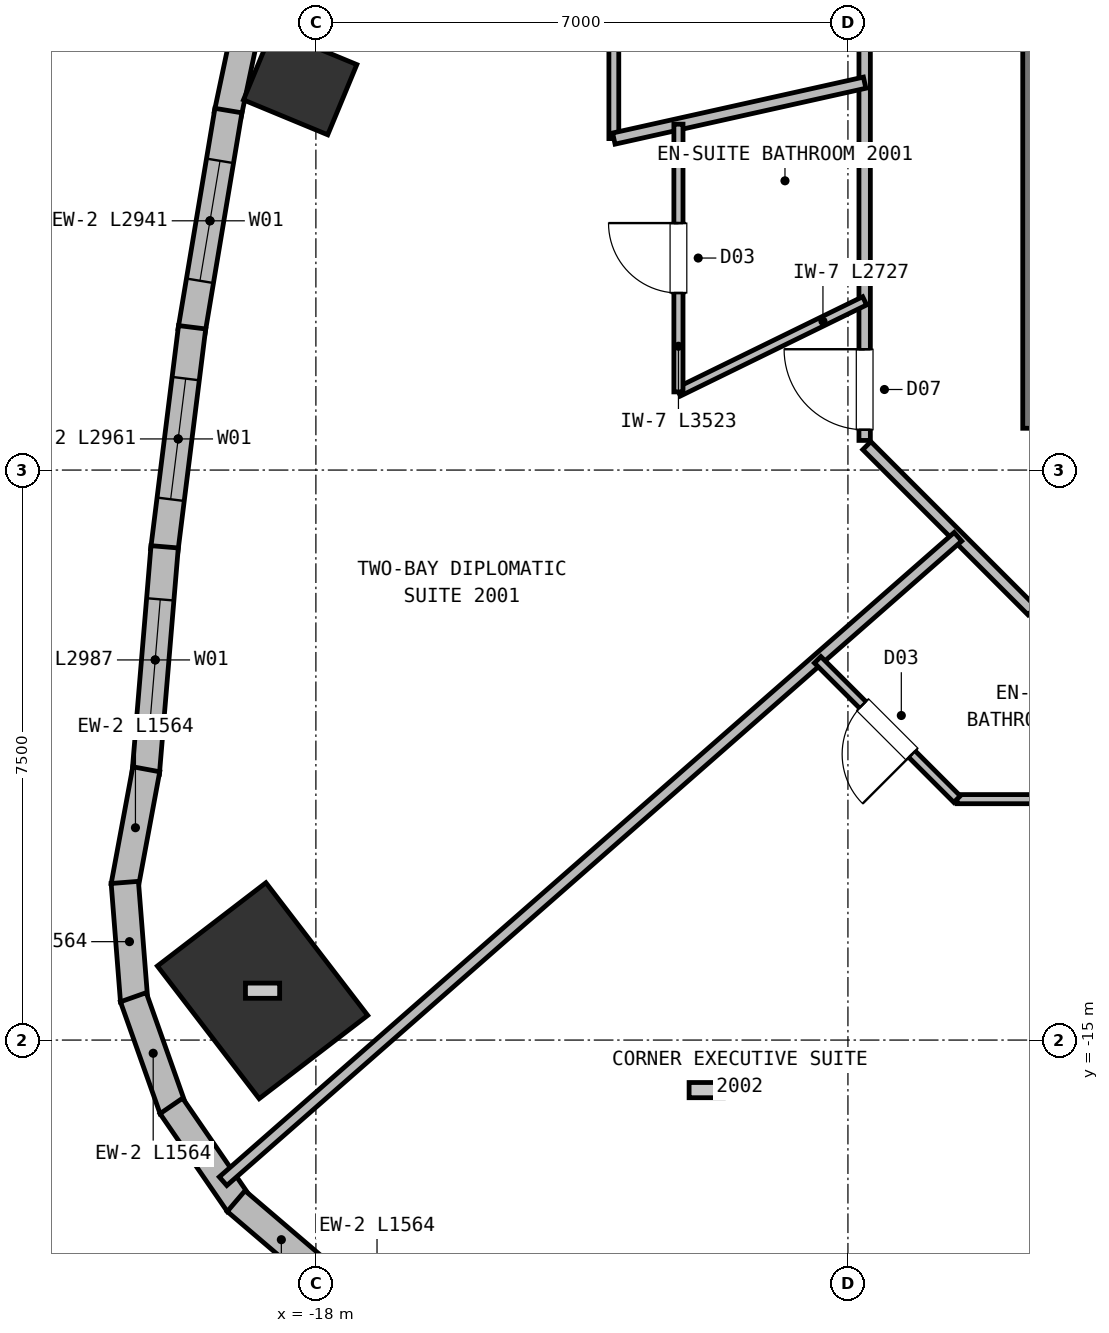
"""IFC4 building model, lengths in metres.
Left out: names, types, materials, properties, quantities, classifications, styles, units other than length and angle.
Written with IfcOpenShell. Run it as: python <this file> out.ifc"""

import sys

from ifc_helpers import new_model, si_unit, direction, frame, frame_2d, origin, origin_2d, place, context, subcontext, project, spatial, rectangle, extrude, element, fill, save


model = new_model("IFC4")
c1 = context("Model", 3, precision=1e-05, world=origin(), true_north=direction((0.0, 1.0)))
c2 = subcontext(c1, "Body", "Model", "MODEL_VIEW")
j1 = project(units=[si_unit("LENGTHUNIT", "METRE"), si_unit("PLANEANGLEUNIT", "RADIAN")], contexts=[c1])
p1 = place(None, origin())
s1 = spatial("IfcSite", under=j1, at=p1, CompositionType="ELEMENT")
p2 = place(p1, origin())
s2 = spatial("IfcBuilding", under=s1, at=p2, CompositionType="ELEMENT")
p3 = place(p2, frame((0.0, 0.0, 71.75)))
s3 = spatial("IfcBuildingStorey", under=s2, at=p3, CompositionType="ELEMENT", Elevation=71.75)
p4 = place(p3, frame((-8.35, -6.95, 0.0), z_axis=(0.0, 0.0, 1.0), x_axis=(0.0, 1.0, 0.0)))
e1 = element("IfcWall", 1, at=p4, inside=s3, PredefinedType="SHEAR", context=c2, shape_type="SweptSolid", body=[
    extrude(rectangle(XDim=8.1, YDim=0.7, at=frame_2d((4.05, 0.0))), origin(), (0.0, 0.0, 1.0), 3.5),
])
p5 = place(p3, frame((-18.207, -2.397, 0.0), z_axis=(0.0, 0.0, 1.0), x_axis=(0.382683432365, 0.923879532511, 0.0)))
e2 = element("IfcColumn", 2, at=p5, inside=s3, PredefinedType="COLUMN", context=c2, shape_type="SweptSolid", body=[
    extrude(rectangle(XDim=1.0, YDim=1.2, at=origin_2d()), origin(), (0.0, 0.0, 1.0), 3.75),
])
p6 = place(p3, frame((-18.702, -14.351, 0.0), z_axis=(0.0, 0.0, 1.0), x_axis=(0.793353340291, 0.608761429009, 0.0)))
e3 = element("IfcColumn", 3, at=p6, inside=s3, PredefinedType="COLUMN", context=c2, shape_type="SweptSolid", body=[
    extrude(rectangle(XDim=1.8, YDim=2.2, at=origin_2d()), origin(), (0.0, 0.0, 1.0), 3.75),
])
p7 = place(p3, frame((-19.16, -2.819, 0.0), z_axis=(0.0, 0.0, 1.0), x_axis=(0.206216567534, 0.978506375694, 0.0)))
e4 = element("IfcWall", 4, at=p7, inside=s3, PredefinedType="SOLIDWALL", context=c2, shape_type="SweptSolid", body=[
    extrude(rectangle(XDim=2.926, YDim=0.36, at=frame_2d((1.463, 0.0))), origin(), (0.0, 0.0, 1.0), 3.5),
])
p8 = place(p3, frame((-19.636, -5.671, 0.0), z_axis=(0.0, 0.0, 1.0), x_axis=(0.164870141486, 0.986315282476, 0.0)))
e5 = element("IfcWall", 5, at=p8, inside=s3, PredefinedType="SOLIDWALL", context=c2, shape_type="SweptSolid", body=[
    extrude(rectangle(XDim=2.941, YDim=0.36, at=frame_2d((1.47, 0.0))), origin(), (0.0, 0.0, 1.0), 3.5),
])
p9 = place(p8, frame((0.67, 0.0, 0.72)))
e6 = element("IfcOpeningElement", 6, at=p9, cuts=e5, PredefinedType="OPENING", context=c2, shape_type="SweptSolid", body=[
    extrude(rectangle(XDim=1.6, YDim=1.88, at=frame_2d((0.8, 0.94))), frame((0.0, 0.19, 0.0), z_axis=(0.0, -1.0, 0.0), x_axis=(1.0, 0.0, 0.0)), (0.0, 0.0, 1.0), 0.38),
])
p10 = place(p3, frame((-19.995, -8.56, 0.0), z_axis=(0.0, 0.0, 1.0), x_axis=(0.123740486397, 0.99231461343, 0.0)))
e7 = element("IfcWall", 7, at=p10, inside=s3, PredefinedType="SOLIDWALL", context=c2, shape_type="SweptSolid", body=[
    extrude(rectangle(XDim=2.961, YDim=0.36, at=frame_2d((1.481, 0.0))), origin(), (0.0, 0.0, 1.0), 3.5),
])
p11 = place(p10, frame((0.681, 0.0, 0.72)))
e8 = element("IfcOpeningElement", 8, at=p11, cuts=e7, PredefinedType="OPENING", context=c2, shape_type="SweptSolid", body=[
    extrude(rectangle(XDim=1.6, YDim=1.88, at=frame_2d((0.8, 0.94))), frame((0.0, 0.19, 0.0), z_axis=(0.0, -1.0, 0.0), x_axis=(1.0, 0.0, 0.0)), (0.0, 0.0, 1.0), 0.38),
])
p12 = place(p3, frame((-20.238, -11.487, 0.0), z_axis=(0.0, 0.0, 1.0), x_axis=(0.083126652996, 0.996538990487, 0.0)))
e9 = element("IfcWall", 9, at=p12, inside=s3, PredefinedType="SOLIDWALL", context=c2, shape_type="SweptSolid", body=[
    extrude(rectangle(XDim=2.987, YDim=0.36, at=frame_2d((1.493, 0.0))), origin(), (0.0, 0.0, 1.0), 3.5),
])
p13 = place(p12, frame((0.694, 0.0, 0.72)))
e10 = element("IfcOpeningElement", 10, at=p13, cuts=e9, PredefinedType="OPENING", context=c2, shape_type="SweptSolid", body=[
    extrude(rectangle(XDim=1.6, YDim=1.88, at=frame_2d((0.8, 0.94))), frame((0.0, 0.19, 0.0), z_axis=(0.0, -1.0, 0.0), x_axis=(1.0, 0.0, 0.0)), (0.0, 0.0, 1.0), 0.38),
])
for number, where, z_axis, x_axis in (
    (11, (-20.517, -12.975, 0.0), (0.0, 0.0, 1.0), (0.182, 0.983, 0.0)),
    (12, (-20.391, -14.485, 0.0), (0.0, 0.0, 1.0), (-0.079, 0.997, 0.0)),
    (13, (-19.88, -15.911, 0.0), (0.0, 0.0, 1.0), (-0.334, 0.943, 0.0)),
):
    element("IfcWall", number, at=place(p3, frame(where, z_axis=z_axis, x_axis=x_axis)), inside=s3, PredefinedType="SOLIDWALL", context=c2, shape_type="SweptSolid", body=[
        extrude(rectangle(XDim=1.564, YDim=0.36, at=frame_2d((0.782, 0.0))), origin(), (0.0, 0.0, 1.0), 3.5),
    ])
for number, where, z_axis, x_axis in (
    (14, (-19.016, -17.156, 0.0), (0.0, 0.0, 1.0), (-0.566, 0.824, 0.0)),
    (15, (-17.86, -18.135, 0.0), (0.0, 0.0, 1.0), (-0.76, 0.649, 0.0)),
):
    element("IfcWall", number, at=place(p3, frame(where, z_axis=z_axis, x_axis=x_axis)), inside=s3, PredefinedType="SOLIDWALL", context=c2, shape_type="SweptSolid", body=[
        extrude(rectangle(XDim=1.564, YDim=0.36, at=frame_2d((0.782, 0.0))), origin(), (0.0, 0.0, 1.0), 3.5),
    ])
p14 = place(p3, frame((-10.78, -7.11, 0.0), z_axis=(0.0, 0.0, 1.0), x_axis=(0.0, 1.0, 0.0)))
e16 = element("IfcWall", 16, at=p14, inside=s3, PredefinedType="PARTITIONING", context=c2, shape_type="SweptSolid", body=[
    extrude(rectangle(XDim=14.22, YDim=0.15, at=frame_2d((7.11, 0.0))), origin(), (0.0, 0.0, 1.0), 3.12),
])
p15 = place(p14, frame((5.471, 0.0, 0.0)))
e17 = element("IfcOpeningElement", 17, at=p15, cuts=e16, PredefinedType="OPENING", context=c2, shape_type="SweptSolid", body=[
    extrude(rectangle(XDim=0.95, YDim=2.1, at=frame_2d((0.475, 1.05))), frame((0.0, 0.085, 0.0), z_axis=(0.0, -1.0, 0.0), x_axis=(1.0, 0.0, 0.0)), (0.0, 0.0, 1.0), 0.17),
])
p16 = place(p14, frame((7.83, 0.0, 0.0)))
e18 = element("IfcOpeningElement", 18, at=p16, cuts=e16, PredefinedType="OPENING", context=c2, shape_type="SweptSolid", body=[
    extrude(rectangle(XDim=1.0, YDim=2.15, at=frame_2d((0.5, 1.075))), frame((0.0, 0.085, 0.0), z_axis=(0.0, -1.0, 0.0), x_axis=(1.0, 0.0, 0.0)), (0.0, 0.0, 1.0), 0.17),
])
p17 = place(p14, frame((11.294, 0.0, 0.0)))
e19 = element("IfcOpeningElement", 19, at=p17, cuts=e16, PredefinedType="OPENING", context=c2, shape_type="SweptSolid", body=[
    extrude(rectangle(XDim=1.0, YDim=2.15, at=frame_2d((0.5, 1.075))), frame((0.0, 0.085, 0.0), z_axis=(0.0, -1.0, 0.0), x_axis=(1.0, 0.0, 0.0)), (0.0, 0.0, 1.0), 0.17),
])
p18 = place(p14, frame((0.14, 0.0, 0.0)))
e20 = element("IfcOpeningElement", 20, at=p18, cuts=e16, PredefinedType="OPENING", context=c2, shape_type="SweptSolid", body=[
    extrude(rectangle(XDim=1.06, YDim=2.15, at=frame_2d((0.53, 1.075))), frame((0.0, 0.085, 0.0), z_axis=(0.0, -1.0, 0.0), x_axis=(1.0, 0.0, 0.0)), (0.0, 0.0, 1.0), 0.17),
])
p19 = place(p3, frame((-8.578, -9.352, 0.0), z_axis=(0.0, 0.0, 1.0), x_axis=(-0.707067066127, 0.707146494016, 0.0)))
e21 = element("IfcWall", 21, at=p19, inside=s3, PredefinedType="PARTITIONING", context=c2, shape_type="SweptSolid", body=[
    extrude(rectangle(XDim=3.074, YDim=0.15, at=frame_2d((1.537, 0.0))), origin(), (0.0, 0.0, 1.0), 3.5),
])
p20 = place(p3, frame((-14.08, -3.138, 0.0), z_axis=(0.0, 0.0, 1.0), x_axis=(0.0, 1.0, 0.0)))
e22 = element("IfcWall", 22, at=p20, inside=s3, PredefinedType="PARTITIONING", context=c2, shape_type="SweptSolid", body=[
    extrude(rectangle(XDim=3.111, YDim=0.13, at=frame_2d((1.555, 0.0))), origin(), (0.0, 0.0, 1.0), 3.5),
])
p21 = place(p3, frame((-10.78, -2.403, 0.0), z_axis=(0.0, 0.0, 1.0), x_axis=(-0.976045834457, -0.217564999572, 0.0)))
e23 = element("IfcWall", 23, at=p21, inside=s3, PredefinedType="PARTITIONING", context=c2, shape_type="SweptSolid", body=[
    extrude(rectangle(XDim=3.381, YDim=0.15, at=frame_2d((1.69, 0.0))), origin(), (0.0, 0.0, 1.0), 3.5),
])
p22 = place(p3, frame((-10.78, -5.273, 0.0), z_axis=(0.0, 0.0, 1.0), x_axis=(-0.898278372968, -0.439426859282, 0.0)))
e24 = element("IfcWall", 24, at=p22, inside=s3, PredefinedType="PARTITIONING", context=c2, shape_type="SweptSolid", body=[
    extrude(rectangle(XDim=2.727, YDim=0.12, at=frame_2d((1.364, 0.0))), origin(), (0.0, 0.0, 1.0), 3.5),
])
p23 = place(p3, frame((-13.23, -6.472, 0.0), z_axis=(0.0, 0.0, 1.0), x_axis=(0.0, 1.0, 0.0)))
e25 = element("IfcWall", 25, at=p23, inside=s3, PredefinedType="PARTITIONING", context=c2, shape_type="SweptSolid", body=[
    extrude(rectangle(XDim=3.523, YDim=0.12, at=frame_2d((1.761, 0.0))), origin(), (0.0, 0.0, 1.0), 3.12),
])
p24 = place(p23, frame((1.301, 0.0, 0.0)))
e26 = element("IfcOpeningElement", 26, at=p24, cuts=e25, PredefinedType="OPENING", context=c2, shape_type="SweptSolid", body=[
    extrude(rectangle(XDim=0.92, YDim=2.1, at=frame_2d((0.46, 1.05))), frame((0.0, 0.07, 0.0), z_axis=(0.0, -1.0, 0.0), x_axis=(1.0, 0.0, 0.0)), (0.0, 0.0, 1.0), 0.14),
])
p25 = place(p3, frame((-9.552, -8.377, 0.0), z_axis=(0.0, 0.0, 1.0), x_axis=(-0.751837697968, -0.659348220529, 0.0)))
e27 = element("IfcWall", 27, at=p25, inside=s3, PredefinedType="PARTITIONING", context=c2, shape_type="SweptSolid", body=[
    extrude(rectangle(XDim=12.86, YDim=0.15, at=frame_2d((6.43, 0.0))), origin(), (0.0, 0.0, 1.0), 3.5),
])
p26 = place(p3, frame((-7.619, -11.83, 0.0), z_axis=(0.0, 0.0, 1.0), x_axis=(-1.0, 0.0, 0.0)))
e28 = element("IfcWall", 28, at=p26, inside=s3, PredefinedType="PARTITIONING", context=c2, shape_type="SweptSolid", body=[
    extrude(rectangle(XDim=1.946, YDim=0.12, at=frame_2d((0.973, 0.0))), origin(), (0.0, 0.0, 1.0), 3.5),
])
p27 = place(p3, frame((-9.565, -11.83, 0.0), z_axis=(0.0, 0.0, 1.0), x_axis=(-0.707106781187, 0.707106781187, 0.0)))
e29 = element("IfcWall", 29, at=p27, inside=s3, PredefinedType="PARTITIONING", context=c2, shape_type="SweptSolid", body=[
    extrude(rectangle(XDim=2.593, YDim=0.12, at=frame_2d((1.297, 0.0))), origin(), (0.0, 0.0, 1.0), 3.5),
])
p28 = place(p27, frame((0.837, 0.0, 0.0)))
e30 = element("IfcOpeningElement", 30, at=p28, cuts=e29, PredefinedType="OPENING", context=c2, shape_type="SweptSolid", body=[
    extrude(rectangle(XDim=0.92, YDim=2.1, at=frame_2d((0.46, 1.05))), frame((0.0, 0.07, 0.0), z_axis=(0.0, -1.0, 0.0), x_axis=(1.0, 0.0, 0.0)), (0.0, 0.0, 1.0), 0.14),
])
p29 = place(p9, origin())
e31 = element("IfcWindow", 31, at=p29, inside=s3, PartitioningType="SINGLE_PANEL", PredefinedType="WINDOW", context=c2, shape_type="SweptSolid", body=[
    extrude(rectangle(XDim=1.6, YDim=1.88, at=frame_2d((0.8, 0.94))), frame((0.0, 0.03, 0.0), z_axis=(0.0, -1.0, 0.0), x_axis=(1.0, 0.0, 0.0)), (0.0, 0.0, 1.0), 0.06),
])
fill(e6, e31)
p30 = place(p11, origin())
e32 = element("IfcWindow", 32, at=p30, inside=s3, PartitioningType="SINGLE_PANEL", PredefinedType="WINDOW", context=c2, shape_type="SweptSolid", body=[
    extrude(rectangle(XDim=1.6, YDim=1.88, at=frame_2d((0.8, 0.94))), frame((0.0, 0.03, 0.0), z_axis=(0.0, -1.0, 0.0), x_axis=(1.0, 0.0, 0.0)), (0.0, 0.0, 1.0), 0.06),
])
fill(e8, e32)
p31 = place(p13, origin())
e33 = element("IfcWindow", 33, at=p31, inside=s3, PartitioningType="SINGLE_PANEL", PredefinedType="WINDOW", context=c2, shape_type="SweptSolid", body=[
    extrude(rectangle(XDim=1.6, YDim=1.88, at=frame_2d((0.8, 0.94))), frame((0.0, 0.03, 0.0), z_axis=(0.0, -1.0, 0.0), x_axis=(1.0, 0.0, 0.0)), (0.0, 0.0, 1.0), 0.06),
])
fill(e10, e33)
p32 = place(p24, origin())
e34 = element("IfcDoor", 34, at=p32, inside=s3, OperationType="SINGLE_SWING_RIGHT", PredefinedType="DOOR", context=c2, shape_type="SweptSolid", body=[
    extrude(rectangle(XDim=0.92, YDim=2.1, at=frame_2d((0.46, 1.05))), frame((0.0, 0.025, 0.0), z_axis=(0.0, -1.0, 0.0), x_axis=(1.0, 0.0, 0.0)), (0.0, 0.0, 1.0), 0.05),
])
fill(e26, e34)
p33 = place(p28, origin())
e35 = element("IfcDoor", 35, at=p33, inside=s3, OperationType="SINGLE_SWING_LEFT", PredefinedType="DOOR", context=c2, shape_type="SweptSolid", body=[
    extrude(rectangle(XDim=0.92, YDim=2.1, at=frame_2d((0.46, 1.05))), frame((0.0, 0.025, 0.0), z_axis=(0.0, -1.0, 0.0), x_axis=(1.0, 0.0, 0.0)), (0.0, 0.0, 1.0), 0.05),
])
fill(e30, e35)
p34 = place(p18, origin())
e36 = element("IfcDoor", 36, at=p34, inside=s3, OperationType="SINGLE_SWING_RIGHT", PredefinedType="DOOR", context=c2, shape_type="SweptSolid", body=[
    extrude(rectangle(XDim=1.06, YDim=2.15, at=frame_2d((0.53, 1.075))), frame((0.0, 0.025, 0.0), z_axis=(0.0, -1.0, 0.0), x_axis=(1.0, 0.0, 0.0)), (0.0, 0.0, 1.0), 0.05),
])
fill(e20, e36)
save(model, sys.argv[1])
